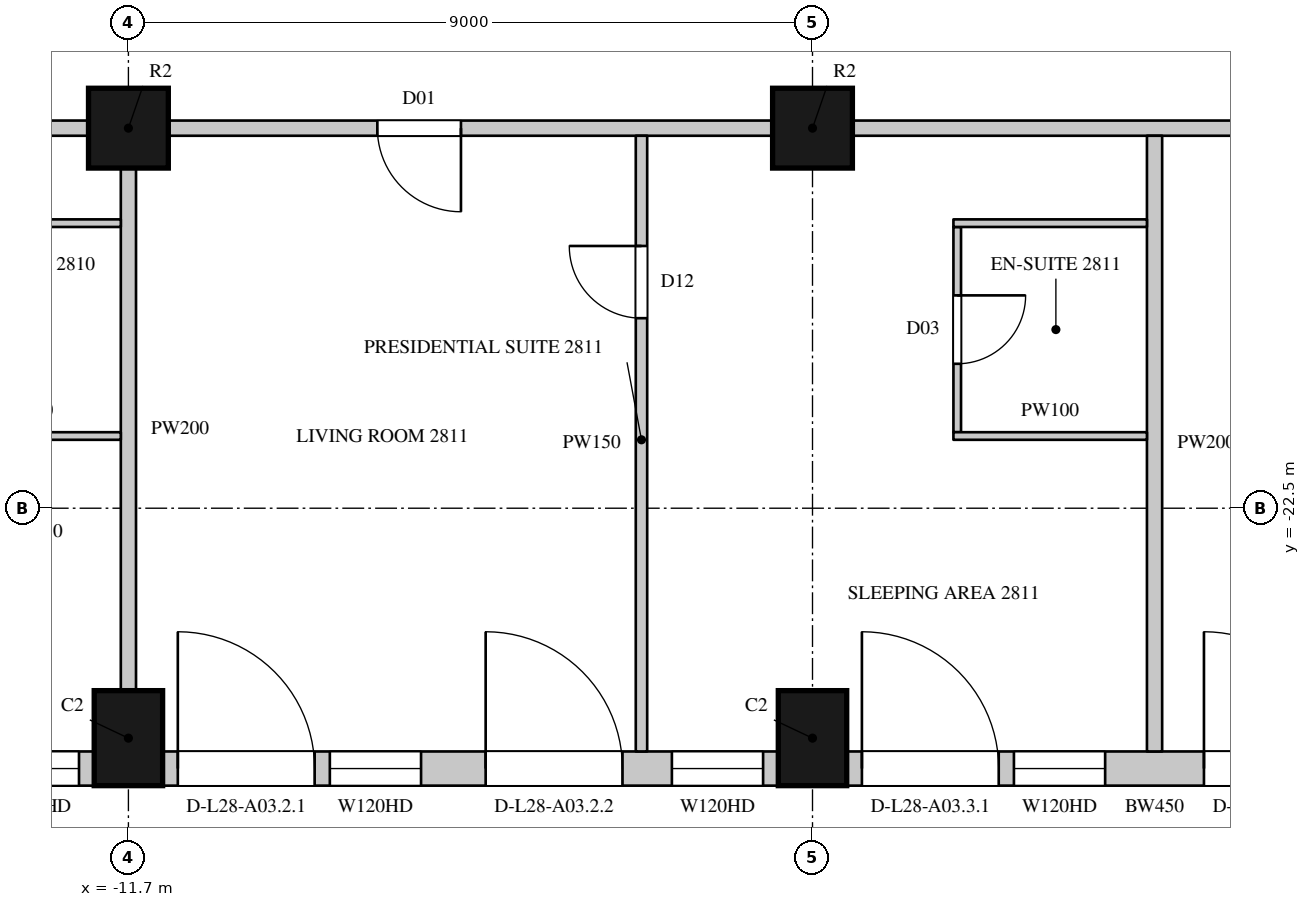
"""IFC4 building model, lengths in metres.
Left out: names, types, materials, properties, quantities, classifications, styles, units other than length and angle.
Written with IfcOpenShell. Run it as: python <this file> out.ifc"""

import sys

from ifc_helpers import new_model, si_unit, direction, frame, frame_2d, origin, origin_2d, place, context, subcontext, project, spatial, rectangle, circle, extrude, element, fill, save


model = new_model("IFC4")
c1 = context("Model", 3, precision=1e-05, world=origin(), true_north=direction((0.0, 1.0)))
c2 = subcontext(c1, "Body", "Model", "MODEL_VIEW")
j1 = project(units=[si_unit("LENGTHUNIT", "METRE"), si_unit("PLANEANGLEUNIT", "RADIAN")], contexts=[c1])
p1 = place(None, origin())
s1 = spatial("IfcSite", under=j1, at=p1, CompositionType="ELEMENT")
p2 = place(p1, origin())
s2 = spatial("IfcBuilding", under=s1, at=p2, CompositionType="ELEMENT")
p3 = place(p2, frame((0.0, 0.0, 131.1)))
s3 = spatial("IfcBuildingStorey", under=s2, at=p3, CompositionType="ELEMENT", Elevation=131.1)
for number, where, z_axis, x_axis in (
    (1, (-11.7, -25.525, 0.0), (0.0, 0.0, 1.0), (1.0, 0.0, 0.0)),
    (2, (-2.7, -25.525, 0.0), (0.0, 0.0, 1.0), (1.0, 0.0, 0.0)),
):
    element("IfcColumn", number, at=place(p3, frame(where, z_axis=z_axis, x_axis=x_axis)), inside=s3, PredefinedType="COLUMN", context=c2, shape_type="SweptSolid", body=[
        extrude(rectangle(XDim=0.9, YDim=1.25, at=origin_2d()), origin(), (0.0, 0.0, 1.0), 3.6),
    ])
for number, where, z_axis, x_axis in (
    (3, (-11.7, -17.5, 0.0), (0.0, 0.0, 1.0), (1.0, 0.0, 0.0)),
    (4, (-2.7, -17.5, 0.0), (0.0, 0.0, 1.0), (1.0, 0.0, 0.0)),
):
    element("IfcColumn", number, at=place(p3, frame(where, z_axis=z_axis, x_axis=x_axis)), inside=s3, PredefinedType="COLUMN", context=c2, shape_type="SweptSolid", body=[
        extrude(circle(Radius=0.525, at=origin_2d()), origin(), (0.0, 0.0, 1.0), 3.6),
    ])
p4 = place(p3, frame((-20.25, -25.925, 0.0), z_axis=(0.0, 0.0, 1.0), x_axis=(1.0, 0.0, 0.0)))
e5 = element("IfcWall", 5, at=p4, inside=s3, PredefinedType="SOLIDWALL", context=c2, shape_type="SweptSolid", body=[
    extrude(rectangle(XDim=8.1, YDim=0.45, at=frame_2d((4.05, 0.0))), origin(), (0.0, 0.0, 1.0), 3.3),
])
p5 = place(p4, frame((0.2, 0.0, 0.0)))
e6 = element("IfcOpeningElement", 6, at=p5, cuts=e5, PredefinedType="OPENING", context=c2, shape_type="SweptSolid", body=[
    extrude(rectangle(XDim=1.8, YDim=2.4, at=frame_2d((0.9, 1.2))), frame((0.0, 0.235, 0.0), z_axis=(0.0, -1.0, 0.0), x_axis=(1.0, 0.0, 0.0)), (0.0, 0.0, 1.0), 0.47),
])
p6 = place(p4, frame((2.2, 0.0, 1.05)))
e7 = element("IfcOpeningElement", 7, at=p6, cuts=e5, PredefinedType="OPENING", context=c2, shape_type="SweptSolid", body=[
    extrude(rectangle(XDim=1.2, YDim=2.0, at=frame_2d((0.6, 1.0))), frame((0.0, 0.235, 0.0), z_axis=(0.0, -1.0, 0.0), x_axis=(1.0, 0.0, 0.0)), (0.0, 0.0, 1.0), 0.47),
])
p7 = place(p4, frame((4.7, 0.0, 0.0)))
e8 = element("IfcOpeningElement", 8, at=p7, cuts=e5, PredefinedType="OPENING", context=c2, shape_type="SweptSolid", body=[
    extrude(rectangle(XDim=1.8, YDim=2.4, at=frame_2d((0.9, 1.2))), frame((0.0, 0.235, 0.0), z_axis=(0.0, -1.0, 0.0), x_axis=(1.0, 0.0, 0.0)), (0.0, 0.0, 1.0), 0.47),
])
p8 = place(p4, frame((6.7, 0.0, 1.05)))
e9 = element("IfcOpeningElement", 9, at=p8, cuts=e5, PredefinedType="OPENING", context=c2, shape_type="SweptSolid", body=[
    extrude(rectangle(XDim=1.2, YDim=2.0, at=frame_2d((0.6, 1.0))), frame((0.0, 0.235, 0.0), z_axis=(0.0, -1.0, 0.0), x_axis=(1.0, 0.0, 0.0)), (0.0, 0.0, 1.0), 0.47),
])
p9 = place(p3, frame((-11.25, -25.925, 0.0), z_axis=(0.0, 0.0, 1.0), x_axis=(1.0, 0.0, 0.0)))
e10 = element("IfcWall", 10, at=p9, inside=s3, PredefinedType="SOLIDWALL", context=c2, shape_type="SweptSolid", body=[
    extrude(rectangle(XDim=8.1, YDim=0.45, at=frame_2d((4.05, 0.0))), origin(), (0.0, 0.0, 1.0), 3.3),
])
p10 = place(p9, frame((0.2, 0.0, 0.0)))
e11 = element("IfcOpeningElement", 11, at=p10, cuts=e10, PredefinedType="OPENING", context=c2, shape_type="SweptSolid", body=[
    extrude(rectangle(XDim=1.8, YDim=2.4, at=frame_2d((0.9, 1.2))), frame((0.0, 0.235, 0.0), z_axis=(0.0, -1.0, 0.0), x_axis=(1.0, 0.0, 0.0)), (0.0, 0.0, 1.0), 0.47),
])
p11 = place(p9, frame((2.2, 0.0, 1.05)))
e12 = element("IfcOpeningElement", 12, at=p11, cuts=e10, PredefinedType="OPENING", context=c2, shape_type="SweptSolid", body=[
    extrude(rectangle(XDim=1.2, YDim=2.0, at=frame_2d((0.6, 1.0))), frame((0.0, 0.235, 0.0), z_axis=(0.0, -1.0, 0.0), x_axis=(1.0, 0.0, 0.0)), (0.0, 0.0, 1.0), 0.47),
])
p12 = place(p9, frame((4.25, 0.0, 0.0)))
e13 = element("IfcOpeningElement", 13, at=p12, cuts=e10, PredefinedType="OPENING", context=c2, shape_type="SweptSolid", body=[
    extrude(rectangle(XDim=1.8, YDim=2.4, at=frame_2d((0.9, 1.2))), frame((0.0, 0.235, 0.0), z_axis=(0.0, -1.0, 0.0), x_axis=(1.0, 0.0, 0.0)), (0.0, 0.0, 1.0), 0.47),
])
p13 = place(p9, frame((6.7, 0.0, 1.05)))
e14 = element("IfcOpeningElement", 14, at=p13, cuts=e10, PredefinedType="OPENING", context=c2, shape_type="SweptSolid", body=[
    extrude(rectangle(XDim=1.2, YDim=2.0, at=frame_2d((0.6, 1.0))), frame((0.0, 0.235, 0.0), z_axis=(0.0, -1.0, 0.0), x_axis=(1.0, 0.0, 0.0)), (0.0, 0.0, 1.0), 0.47),
])
p14 = place(p3, frame((-2.25, -25.925, 0.0), z_axis=(0.0, 0.0, 1.0), x_axis=(1.0, 0.0, 0.0)))
e15 = element("IfcWall", 15, at=p14, inside=s3, PredefinedType="SOLIDWALL", context=c2, shape_type="SweptSolid", body=[
    extrude(rectangle(XDim=8.1, YDim=0.45, at=frame_2d((4.05, 0.0))), origin(), (0.0, 0.0, 1.0), 3.3),
])
p15 = place(p14, frame((0.2, 0.0, 0.0)))
e16 = element("IfcOpeningElement", 16, at=p15, cuts=e15, PredefinedType="OPENING", context=c2, shape_type="SweptSolid", body=[
    extrude(rectangle(XDim=1.8, YDim=2.4, at=frame_2d((0.9, 1.2))), frame((0.0, 0.235, 0.0), z_axis=(0.0, -1.0, 0.0), x_axis=(1.0, 0.0, 0.0)), (0.0, 0.0, 1.0), 0.47),
])
p16 = place(p14, frame((2.2, 0.0, 1.05)))
e17 = element("IfcOpeningElement", 17, at=p16, cuts=e15, PredefinedType="OPENING", context=c2, shape_type="SweptSolid", body=[
    extrude(rectangle(XDim=1.2, YDim=2.0, at=frame_2d((0.6, 1.0))), frame((0.0, 0.235, 0.0), z_axis=(0.0, -1.0, 0.0), x_axis=(1.0, 0.0, 0.0)), (0.0, 0.0, 1.0), 0.47),
])
p17 = place(p14, frame((4.7, 0.0, 0.0)))
e18 = element("IfcOpeningElement", 18, at=p17, cuts=e15, PredefinedType="OPENING", context=c2, shape_type="SweptSolid", body=[
    extrude(rectangle(XDim=1.8, YDim=2.4, at=frame_2d((0.9, 1.2))), frame((0.0, 0.235, 0.0), z_axis=(0.0, -1.0, 0.0), x_axis=(1.0, 0.0, 0.0)), (0.0, 0.0, 1.0), 0.47),
])
p18 = place(p14, frame((6.7, 0.0, 1.05)))
e19 = element("IfcOpeningElement", 19, at=p18, cuts=e15, PredefinedType="OPENING", context=c2, shape_type="SweptSolid", body=[
    extrude(rectangle(XDim=1.2, YDim=2.0, at=frame_2d((0.6, 1.0))), frame((0.0, 0.235, 0.0), z_axis=(0.0, -1.0, 0.0), x_axis=(1.0, 0.0, 0.0)), (0.0, 0.0, 1.0), 0.47),
])
p19 = place(p3, frame((-18.8, -17.5, 0.0), z_axis=(0.0, 0.0, 1.0), x_axis=(1.0, 0.0, 0.0)))
e20 = element("IfcWall", 20, at=p19, inside=s3, PredefinedType="PARTITIONING", context=c2, shape_type="SweptSolid", body=[
    extrude(rectangle(XDim=6.575, YDim=0.2, at=frame_2d((3.288, 0.0))), origin(), (0.0, 0.0, 1.0), 2.75),
])
p20 = place(p3, frame((-11.175, -17.5, 0.0), z_axis=(0.0, 0.0, 1.0), x_axis=(1.0, 0.0, 0.0)))
e21 = element("IfcWall", 21, at=p20, inside=s3, PredefinedType="PARTITIONING", context=c2, shape_type="SweptSolid", body=[
    extrude(rectangle(XDim=7.95, YDim=0.2, at=frame_2d((3.975, 0.0))), origin(), (0.0, 0.0, 1.0), 2.75),
])
p21 = place(p20, frame((2.75, 0.0, 0.0)))
e22 = element("IfcOpeningElement", 22, at=p21, cuts=e21, PredefinedType="OPENING", context=c2, shape_type="SweptSolid", body=[
    extrude(rectangle(XDim=1.1, YDim=2.4, at=frame_2d((0.55, 1.2))), frame((0.0, 0.11, 0.0), z_axis=(0.0, -1.0, 0.0), x_axis=(1.0, 0.0, 0.0)), (0.0, 0.0, 1.0), 0.22),
])
p22 = place(p3, frame((-2.175, -17.5, 0.0), z_axis=(0.0, 0.0, 1.0), x_axis=(1.0, 0.0, 0.0)))
e23 = element("IfcWall", 23, at=p22, inside=s3, PredefinedType="PARTITIONING", context=c2, shape_type="SweptSolid", body=[
    extrude(rectangle(XDim=7.95, YDim=0.2, at=frame_2d((3.975, 0.0))), origin(), (0.0, 0.0, 1.0), 2.75),
])
p23 = place(p22, frame((5.2, 0.0, 0.0)))
e24 = element("IfcOpeningElement", 24, at=p23, cuts=e23, PredefinedType="OPENING", context=c2, shape_type="SweptSolid", body=[
    extrude(rectangle(XDim=1.1, YDim=2.4, at=frame_2d((0.55, 1.2))), frame((0.0, 0.11, 0.0), z_axis=(0.0, -1.0, 0.0), x_axis=(1.0, 0.0, 0.0)), (0.0, 0.0, 1.0), 0.22),
])
p24 = place(p3, frame((-4.95, -25.7, 0.0), z_axis=(0.0, 0.0, 1.0), x_axis=(0.0, 1.0, 0.0)))
e25 = element("IfcWall", 25, at=p24, inside=s3, PredefinedType="PARTITIONING", context=c2, shape_type="SweptSolid", body=[
    extrude(rectangle(XDim=8.1, YDim=0.15, at=frame_2d((4.05, 0.0))), origin(), (0.0, 0.0, 1.0), 3.3),
])
p25 = place(p24, frame((5.7, 0.0, 0.0)))
e26 = element("IfcOpeningElement", 26, at=p25, cuts=e25, PredefinedType="OPENING", context=c2, shape_type="SweptSolid", body=[
    extrude(rectangle(XDim=0.95, YDim=2.2, at=frame_2d((0.475, 1.1))), frame((0.0, 0.085, 0.0), z_axis=(0.0, -1.0, 0.0), x_axis=(1.0, 0.0, 0.0)), (0.0, 0.0, 1.0), 0.17),
])
p26 = place(p3, frame((-11.7, -24.9, 0.0), z_axis=(0.0, 0.0, 1.0), x_axis=(0.0, 1.0, 0.0)))
e27 = element("IfcWall", 27, at=p26, inside=s3, PredefinedType="PARTITIONING", context=c2, shape_type="SweptSolid", body=[
    extrude(rectangle(XDim=6.875, YDim=0.2, at=frame_2d((3.438, 0.0))), origin(), (0.0, 0.0, 1.0), 2.75),
])
p27 = place(p3, frame((1.8, -25.7, 0.0), z_axis=(0.0, 0.0, 1.0), x_axis=(0.0, 1.0, 0.0)))
e28 = element("IfcWall", 28, at=p27, inside=s3, PredefinedType="PARTITIONING", context=c2, shape_type="SweptSolid", body=[
    extrude(rectangle(XDim=8.1, YDim=0.2, at=frame_2d((4.05, 0.0))), origin(), (0.0, 0.0, 1.0), 2.65),
])
for number, where, z_axis, x_axis in (
    (29, (-14.346, -21.55, 0.0), (0.0, 0.0, 1.0), (1.0, 0.0, 0.0)),
    (30, (-14.346, -18.75, 0.0), (0.0, 0.0, 1.0), (1.0, 0.0, 0.0)),
):
    element("IfcWall", number, at=place(p3, frame(where, z_axis=z_axis, x_axis=x_axis)), inside=s3, PredefinedType="PARTITIONING", context=c2, shape_type="SweptSolid", body=[
        extrude(rectangle(XDim=2.546, YDim=0.1, at=frame_2d((1.273, 0.0))), origin(), (0.0, 0.0, 1.0), 3.3),
    ])
p28 = place(p3, frame((-0.796, -21.5, 0.0), z_axis=(0.0, 0.0, 1.0), x_axis=(0.0, 1.0, 0.0)))
e31 = element("IfcWall", 31, at=p28, inside=s3, PredefinedType="PARTITIONING", context=c2, shape_type="SweptSolid", body=[
    extrude(rectangle(XDim=2.7, YDim=0.1, at=frame_2d((1.35, 0.0))), origin(), (0.0, 0.0, 1.0), 3.3),
])
p29 = place(p28, frame((0.9, 0.0, 0.0)))
e32 = element("IfcOpeningElement", 32, at=p29, cuts=e31, PredefinedType="OPENING", context=c2, shape_type="SweptSolid", body=[
    extrude(rectangle(XDim=0.9, YDim=2.2, at=frame_2d((0.45, 1.1))), frame((0.0, 0.06, 0.0), z_axis=(0.0, -1.0, 0.0), x_axis=(1.0, 0.0, 0.0)), (0.0, 0.0, 1.0), 0.12),
])
for number, where, z_axis, x_axis in (
    (33, (-0.846, -21.55, 0.0), (0.0, 0.0, 1.0), (1.0, 0.0, 0.0)),
    (34, (-0.846, -18.75, 0.0), (0.0, 0.0, 1.0), (1.0, 0.0, 0.0)),
):
    element("IfcWall", number, at=place(p3, frame(where, z_axis=z_axis, x_axis=x_axis)), inside=s3, PredefinedType="PARTITIONING", context=c2, shape_type="SweptSolid", body=[
        extrude(rectangle(XDim=2.546, YDim=0.1, at=frame_2d((1.273, 0.0))), origin(), (0.0, 0.0, 1.0), 3.3),
    ])
p30 = place(p8, origin())
e35 = element("IfcWindow", 35, at=p30, inside=s3, PartitioningType="SINGLE_PANEL", PredefinedType="WINDOW", context=c2, shape_type="SweptSolid", body=[
    extrude(rectangle(XDim=1.2, YDim=2.0, at=frame_2d((0.6, 1.0))), frame((0.0, 0.135, 0.0), z_axis=(0.0, -1.0, 0.0), x_axis=(1.0, 0.0, 0.0)), (0.0, 0.0, 1.0), 0.06),
])
fill(e9, e35)
p31 = place(p10, origin())
e36 = element("IfcDoor", 36, at=p31, inside=s3, OperationType="SLIDING_TO_LEFT", PredefinedType="DOOR", context=c2, shape_type="SweptSolid", body=[
    extrude(rectangle(XDim=1.8, YDim=2.4, at=frame_2d((0.9, 1.2))), frame((0.0, 0.13, 0.0), z_axis=(0.0, -1.0, 0.0), x_axis=(1.0, 0.0, 0.0)), (0.0, 0.0, 1.0), 0.05),
])
fill(e11, e36)
p32 = place(p11, origin())
e37 = element("IfcWindow", 37, at=p32, inside=s3, PartitioningType="SINGLE_PANEL", PredefinedType="WINDOW", context=c2, shape_type="SweptSolid", body=[
    extrude(rectangle(XDim=1.2, YDim=2.0, at=frame_2d((0.6, 1.0))), frame((0.0, 0.135, 0.0), z_axis=(0.0, -1.0, 0.0), x_axis=(1.0, 0.0, 0.0)), (0.0, 0.0, 1.0), 0.06),
])
fill(e12, e37)
p33 = place(p12, origin())
e38 = element("IfcDoor", 38, at=p33, inside=s3, OperationType="SLIDING_TO_LEFT", PredefinedType="DOOR", context=c2, shape_type="SweptSolid", body=[
    extrude(rectangle(XDim=1.8, YDim=2.4, at=frame_2d((0.9, 1.2))), frame((0.0, 0.13, 0.0), z_axis=(0.0, -1.0, 0.0), x_axis=(1.0, 0.0, 0.0)), (0.0, 0.0, 1.0), 0.05),
])
fill(e13, e38)
p34 = place(p13, origin())
e39 = element("IfcWindow", 39, at=p34, inside=s3, PartitioningType="SINGLE_PANEL", PredefinedType="WINDOW", context=c2, shape_type="SweptSolid", body=[
    extrude(rectangle(XDim=1.2, YDim=2.0, at=frame_2d((0.6, 1.0))), frame((0.0, 0.135, 0.0), z_axis=(0.0, -1.0, 0.0), x_axis=(1.0, 0.0, 0.0)), (0.0, 0.0, 1.0), 0.06),
])
fill(e14, e39)
p35 = place(p15, origin())
e40 = element("IfcDoor", 40, at=p35, inside=s3, OperationType="SLIDING_TO_LEFT", PredefinedType="DOOR", context=c2, shape_type="SweptSolid", body=[
    extrude(rectangle(XDim=1.8, YDim=2.4, at=frame_2d((0.9, 1.2))), frame((0.0, 0.13, 0.0), z_axis=(0.0, -1.0, 0.0), x_axis=(1.0, 0.0, 0.0)), (0.0, 0.0, 1.0), 0.05),
])
fill(e16, e40)
p36 = place(p16, origin())
e41 = element("IfcWindow", 41, at=p36, inside=s3, PartitioningType="SINGLE_PANEL", PredefinedType="WINDOW", context=c2, shape_type="SweptSolid", body=[
    extrude(rectangle(XDim=1.2, YDim=2.0, at=frame_2d((0.6, 1.0))), frame((0.0, 0.135, 0.0), z_axis=(0.0, -1.0, 0.0), x_axis=(1.0, 0.0, 0.0)), (0.0, 0.0, 1.0), 0.06),
])
fill(e17, e41)
p37 = place(p17, origin())
e42 = element("IfcDoor", 42, at=p37, inside=s3, OperationType="SLIDING_TO_LEFT", PredefinedType="DOOR", context=c2, shape_type="SweptSolid", body=[
    extrude(rectangle(XDim=1.8, YDim=2.4, at=frame_2d((0.9, 1.2))), frame((0.0, 0.13, 0.0), z_axis=(0.0, -1.0, 0.0), x_axis=(1.0, 0.0, 0.0)), (0.0, 0.0, 1.0), 0.05),
])
fill(e18, e42)
p38 = place(p21, origin())
e43 = element("IfcDoor", 43, at=p38, inside=s3, OperationType="SINGLE_SWING_LEFT", PredefinedType="DOOR", context=c2, shape_type="SweptSolid", body=[
    extrude(rectangle(XDim=1.1, YDim=2.4, at=frame_2d((0.55, 1.2))), frame((0.0, 0.025, 0.0), z_axis=(0.0, -1.0, 0.0), x_axis=(1.0, 0.0, 0.0)), (0.0, 0.0, 1.0), 0.05),
])
fill(e22, e43)
p39 = place(p25, origin())
e44 = element("IfcDoor", 44, at=p39, inside=s3, OperationType="SINGLE_SWING_RIGHT", PredefinedType="DOOR", context=c2, shape_type="SweptSolid", body=[
    extrude(rectangle(XDim=0.95, YDim=2.2, at=frame_2d((0.475, 1.1))), frame((0.0, 0.025, 0.0), z_axis=(0.0, -1.0, 0.0), x_axis=(1.0, 0.0, 0.0)), (0.0, 0.0, 1.0), 0.05),
])
fill(e26, e44)
p40 = place(p29, origin())
e45 = element("IfcDoor", 45, at=p40, inside=s3, OperationType="SINGLE_SWING_LEFT", PredefinedType="DOOR", context=c2, shape_type="SweptSolid", body=[
    extrude(rectangle(XDim=0.9, YDim=2.2, at=frame_2d((0.45, 1.1))), frame((0.0, 0.025, 0.0), z_axis=(0.0, -1.0, 0.0), x_axis=(1.0, 0.0, 0.0)), (0.0, 0.0, 1.0), 0.05),
])
fill(e32, e45)
save(model, sys.argv[1])
